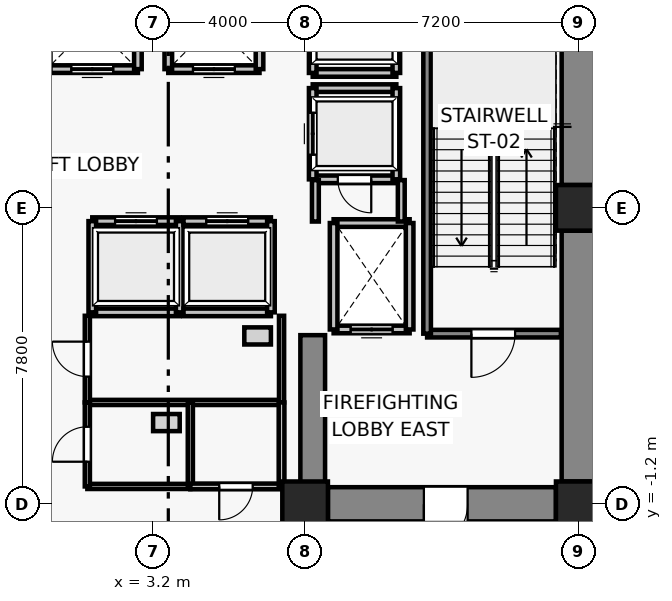
"""IFC4 building model, lengths in metres.
Left out: names, types, materials, properties, quantities, classifications, styles, units other than length and angle.
Written with IfcOpenShell. Run it as: python <this file> out.ifc"""

import sys

from ifc_helpers import new_model, si_unit, direction, frame, frame_2d, origin, origin_2d, place, context, subcontext, project, spatial, rectangle, extrude, source, transform, mapped, element, fill, save


model = new_model("IFC4")
c1 = context("Model", 3, precision=1e-05, world=origin(), true_north=direction((0.0, 1.0)))
c2 = subcontext(c1, "Body", "Model", "MODEL_VIEW")
j1 = project(units=[si_unit("LENGTHUNIT", "METRE"), si_unit("PLANEANGLEUNIT", "RADIAN")], contexts=[c1])
p1 = place(None, origin())
s1 = spatial("IfcSite", under=j1, at=p1, CompositionType="ELEMENT")
p2 = place(p1, origin())
s2 = spatial("IfcBuilding", under=s1, at=p2, CompositionType="ELEMENT")
p3 = place(p2, origin())
s3 = spatial("IfcBuildingStorey", under=s2, at=p3, CompositionType="ELEMENT", Elevation=0.0)
for number, where, z_axis, x_axis in (
    (1, (7.2, -1.2, 0.0), (0.0, 0.0, 1.0), (1.0, 0.0, 0.0)),
    (2, (14.4, -1.2, 0.0), (0.0, 0.0, 1.0), (1.0, 0.0, 0.0)),
    (3, (14.4, 6.6, 0.0), (0.0, 0.0, 1.0), (1.0, 0.0, 0.0)),
):
    element("IfcColumn", number, at=place(p3, frame(where, z_axis=z_axis, x_axis=x_axis)), inside=s3, PredefinedType="COLUMN", context=c2, shape_type="SweptSolid", body=[
        extrude(rectangle(XDim=1.2, YDim=1.2, at=origin_2d()), origin(), (0.0, 0.0, 1.0), 5.0),
    ])
p4 = place(p3, frame((14.4, -0.6, 0.0), z_axis=(0.0, 0.0, 1.0), x_axis=(0.0, 1.0, 0.0)))
e4 = element("IfcWall", 4, at=p4, inside=s3, PredefinedType="SHEAR", context=c2, shape_type="SweptSolid", body=[
    extrude(rectangle(XDim=6.6, YDim=0.9, at=frame_2d((3.3, 0.0))), origin(), (0.0, 0.0, 1.0), 4.7),
])
p5 = place(p3, frame((14.4, 7.2, 0.0), z_axis=(0.0, 0.0, 1.0), x_axis=(0.0, 1.0, 0.0)))
e5 = element("IfcWall", 5, at=p5, inside=s3, PredefinedType="SHEAR", context=c2, shape_type="SweptSolid", body=[
    extrude(rectangle(XDim=5.7, YDim=0.9, at=frame_2d((2.85, 0.0))), origin(), (0.0, 0.0, 1.0), 4.7),
])
p6 = place(p3, frame((13.8, -1.2, 0.0), z_axis=(0.0, 0.0, 1.0), x_axis=(-1.0, 0.0, 0.0)))
e6 = element("IfcWall", 6, at=p6, inside=s3, PredefinedType="SHEAR", context=c2, shape_type="SweptSolid", body=[
    extrude(rectangle(XDim=6.0, YDim=0.9, at=frame_2d((3.0, 0.0))), origin(), (0.0, 0.0, 1.0), 4.7),
])
p7 = place(p6, frame((2.325, 0.0, 0.0)))
e7 = element("IfcOpeningElement", 7, at=p7, cuts=e6, PredefinedType="OPENING", context=c2, shape_type="SweptSolid", body=[
    extrude(rectangle(XDim=1.15, YDim=2.15, at=frame_2d((0.575, 1.075))), frame((0.0, 0.46, 0.0), z_axis=(0.0, -1.0, 0.0), x_axis=(1.0, 0.0, 0.0)), (0.0, 0.0, 1.0), 0.92),
])
p8 = place(p3, frame((7.4, -0.75, 0.0), z_axis=(0.0, 0.0, 1.0), x_axis=(0.0, 1.0, 0.0)))
e8 = element("IfcWall", 8, at=p8, inside=s3, PredefinedType="SHEAR", context=c2, shape_type="SweptSolid", body=[
    extrude(rectangle(XDim=4.0, YDim=0.65, at=frame_2d((2.0, 0.0))), origin(), (0.0, 0.0, 1.0), 4.7),
])
p9 = place(p3, frame((9.95, 3.4, 0.0), z_axis=(0.0, 0.0, 1.0), x_axis=(-1.0, 0.0, 0.0)))
e9 = element("IfcWall", 9, at=p9, inside=s3, PredefinedType="SOLIDWALL", context=c2, shape_type="SweptSolid", body=[
    extrude(rectangle(XDim=2.0, YDim=0.2, at=frame_2d((1.0, 0.0))), origin(), (0.0, 0.0, 1.0), 4.7),
])
p10 = place(p9, frame((0.45, 0.0, 0.0)))
e10 = element("IfcOpeningElement", 10, at=p10, cuts=e9, PredefinedType="OPENING", context=c2, shape_type="SweptSolid", body=[
    extrude(rectangle(XDim=1.1, YDim=2.2, at=frame_2d((0.55, 1.1))), frame((0.0, 0.11, 0.0), z_axis=(0.0, -1.0, 0.0), x_axis=(1.0, 0.0, 0.0)), (0.0, 0.0, 1.0), 0.22),
])
p11 = place(p3, frame((7.95, 6.2, 0.0), z_axis=(0.0, 0.0, 1.0), x_axis=(1.0, 0.0, 0.0)))
e11 = element("IfcWall", 11, at=p11, inside=s3, PredefinedType="SOLIDWALL", context=c2, shape_type="SweptSolid", body=[
    extrude(rectangle(XDim=2.0, YDim=0.2, at=frame_2d((1.0, 0.0))), origin(), (0.0, 0.0, 1.0), 4.7),
])
for number, where, z_axis, x_axis in (
    (12, (7.95, 3.4, 0.0), (0.0, 0.0, 1.0), (0.0, 1.0, 0.0)),
    (13, (9.95, 6.2, 0.0), (0.0, 0.0, 1.0), (0.0, -1.0, 0.0)),
):
    element("IfcWall", number, at=place(p3, frame(where, z_axis=z_axis, x_axis=x_axis)), inside=s3, PredefinedType="SOLIDWALL", context=c2, shape_type="SweptSolid", body=[
        extrude(rectangle(XDim=2.8, YDim=0.2, at=frame_2d((1.4, 0.0))), origin(), (0.0, 0.0, 1.0), 4.7),
    ])
p12 = place(p3, frame((2.8, 10.25, 0.0), z_axis=(0.0, 0.0, 1.0), x_axis=(-1.0, 0.0, 0.0)))
e14 = element("IfcWall", 14, at=p12, inside=s3, PredefinedType="SOLIDWALL", context=c2, shape_type="SweptSolid", body=[
    extrude(rectangle(XDim=2.4, YDim=0.2, at=frame_2d((1.2, 0.0))), origin(), (0.0, 0.0, 1.0), 4.7),
])
p13 = place(p12, frame((0.65, 0.0, 0.0)))
e15 = element("IfcOpeningElement", 15, at=p13, cuts=e14, PredefinedType="OPENING", context=c2, shape_type="SweptSolid", body=[
    extrude(rectangle(XDim=1.1, YDim=2.2, at=frame_2d((0.55, 1.1))), frame((0.0, 0.11, 0.0), z_axis=(0.0, -1.0, 0.0), x_axis=(1.0, 0.0, 0.0)), (0.0, 0.0, 1.0), 0.22),
])
p14 = place(p3, frame((2.8, 12.65, 0.0), z_axis=(0.0, 0.0, 1.0), x_axis=(0.0, -1.0, 0.0)))
e16 = element("IfcWall", 16, at=p14, inside=s3, PredefinedType="SOLIDWALL", context=c2, shape_type="SweptSolid", body=[
    extrude(rectangle(XDim=2.4, YDim=0.2, at=frame_2d((1.2, 0.0))), origin(), (0.0, 0.0, 1.0), 4.7),
])
p15 = place(p3, frame((6.0, 10.25, 0.0), z_axis=(0.0, 0.0, 1.0), x_axis=(-1.0, 0.0, 0.0)))
e17 = element("IfcWall", 17, at=p15, inside=s3, PredefinedType="SOLIDWALL", context=c2, shape_type="SweptSolid", body=[
    extrude(rectangle(XDim=2.4, YDim=0.2, at=frame_2d((1.2, 0.0))), origin(), (0.0, 0.0, 1.0), 4.7),
])
p16 = place(p15, frame((0.65, 0.0, 0.0)))
e18 = element("IfcOpeningElement", 18, at=p16, cuts=e17, PredefinedType="OPENING", context=c2, shape_type="SweptSolid", body=[
    extrude(rectangle(XDim=1.1, YDim=2.2, at=frame_2d((0.55, 1.1))), frame((0.0, 0.11, 0.0), z_axis=(0.0, -1.0, 0.0), x_axis=(1.0, 0.0, 0.0)), (0.0, 0.0, 1.0), 0.22),
])
for number, where, z_axis, x_axis in (
    (19, (3.6, 10.25, 0.0), (0.0, 0.0, 1.0), (0.0, 1.0, 0.0)),
    (20, (6.0, 12.65, 0.0), (0.0, 0.0, 1.0), (0.0, -1.0, 0.0)),
):
    element("IfcWall", number, at=place(p3, frame(where, z_axis=z_axis, x_axis=x_axis)), inside=s3, PredefinedType="SOLIDWALL", context=c2, shape_type="SweptSolid", body=[
        extrude(rectangle(XDim=2.4, YDim=0.2, at=frame_2d((1.2, 0.0))), origin(), (0.0, 0.0, 1.0), 4.7),
    ])
p17 = place(p3, frame((3.9, 3.85, 0.0), z_axis=(0.0, 0.0, 1.0), x_axis=(-1.0, 0.0, 0.0)))
e21 = element("IfcWall", 21, at=p17, inside=s3, PredefinedType="SOLIDWALL", context=c2, shape_type="SweptSolid", body=[
    extrude(rectangle(XDim=2.3, YDim=0.2, at=frame_2d((1.15, 0.0))), origin(), (0.0, 0.0, 1.0), 4.7),
])
p18 = place(p3, frame((1.6, 6.25, 0.0), z_axis=(0.0, 0.0, 1.0), x_axis=(1.0, 0.0, 0.0)))
e22 = element("IfcWall", 22, at=p18, inside=s3, PredefinedType="SOLIDWALL", context=c2, shape_type="SweptSolid", body=[
    extrude(rectangle(XDim=2.3, YDim=0.2, at=frame_2d((1.15, 0.0))), origin(), (0.0, 0.0, 1.0), 4.7),
])
p19 = place(p18, frame((0.6, 0.0, 0.0)))
e23 = element("IfcOpeningElement", 23, at=p19, cuts=e22, PredefinedType="OPENING", context=c2, shape_type="SweptSolid", body=[
    extrude(rectangle(XDim=1.1, YDim=2.2, at=frame_2d((0.55, 1.1))), frame((0.0, 0.11, 0.0), z_axis=(0.0, -1.0, 0.0), x_axis=(1.0, 0.0, 0.0)), (0.0, 0.0, 1.0), 0.22),
])
for number, where, z_axis, x_axis in (
    (24, (1.6, 3.85, 0.0), (0.0, 0.0, 1.0), (0.0, 1.0, 0.0)),
    (25, (3.9, 6.25, 0.0), (0.0, 0.0, 1.0), (0.0, -1.0, 0.0)),
):
    element("IfcWall", number, at=place(p3, frame(where, z_axis=z_axis, x_axis=x_axis)), inside=s3, PredefinedType="SOLIDWALL", context=c2, shape_type="SweptSolid", body=[
        extrude(rectangle(XDim=2.4, YDim=0.2, at=frame_2d((1.2, 0.0))), origin(), (0.0, 0.0, 1.0), 4.7),
    ])
p20 = place(p3, frame((6.3, 3.85, 0.0), z_axis=(0.0, 0.0, 1.0), x_axis=(-1.0, 0.0, 0.0)))
e26 = element("IfcWall", 26, at=p20, inside=s3, PredefinedType="SOLIDWALL", context=c2, shape_type="SweptSolid", body=[
    extrude(rectangle(XDim=2.3, YDim=0.2, at=frame_2d((1.15, 0.0))), origin(), (0.0, 0.0, 1.0), 4.7),
])
p21 = place(p3, frame((4.0, 6.25, 0.0), z_axis=(0.0, 0.0, 1.0), x_axis=(1.0, 0.0, 0.0)))
e27 = element("IfcWall", 27, at=p21, inside=s3, PredefinedType="SOLIDWALL", context=c2, shape_type="SweptSolid", body=[
    extrude(rectangle(XDim=2.3, YDim=0.2, at=frame_2d((1.15, 0.0))), origin(), (0.0, 0.0, 1.0), 4.7),
])
p22 = place(p21, frame((0.6, 0.0, 0.0)))
e28 = element("IfcOpeningElement", 28, at=p22, cuts=e27, PredefinedType="OPENING", context=c2, shape_type="SweptSolid", body=[
    extrude(rectangle(XDim=1.1, YDim=2.2, at=frame_2d((0.55, 1.1))), frame((0.0, 0.11, 0.0), z_axis=(0.0, -1.0, 0.0), x_axis=(1.0, 0.0, 0.0)), (0.0, 0.0, 1.0), 0.22),
])
p23 = place(p3, frame((6.3, 6.25, 0.0), z_axis=(0.0, 0.0, 1.0), x_axis=(0.0, -1.0, 0.0)))
e29 = element("IfcWall", 29, at=p23, inside=s3, PredefinedType="SOLIDWALL", context=c2, shape_type="SweptSolid", body=[
    extrude(rectangle(XDim=2.4, YDim=0.2, at=frame_2d((1.2, 0.0))), origin(), (0.0, 0.0, 1.0), 4.7),
])
p24 = place(p3, frame((9.6, 7.35, 0.0), z_axis=(0.0, 0.0, 1.0), x_axis=(-1.0, 0.0, 0.0)))
e30 = element("IfcWall", 30, at=p24, inside=s3, PredefinedType="SOLIDWALL", context=c2, shape_type="SweptSolid", body=[
    extrude(rectangle(XDim=2.2, YDim=0.2, at=frame_2d((1.1, 0.0))), origin(), (0.0, 0.0, 1.0), 3.79),
])
p25 = place(p24, frame((0.66, 0.0, 0.0)))
e31 = element("IfcOpeningElement", 31, at=p25, cuts=e30, PredefinedType="OPENING", context=c2, shape_type="SweptSolid", body=[
    extrude(rectangle(XDim=0.88, YDim=2.1, at=frame_2d((0.44, 1.05))), frame((0.0, 0.11, 0.0), z_axis=(0.0, -1.0, 0.0), x_axis=(1.0, 0.0, 0.0)), (0.0, 0.0, 1.0), 0.22),
])
p26 = place(p3, frame((7.4, 9.75, 0.0), z_axis=(0.0, 0.0, 1.0), x_axis=(1.0, 0.0, 0.0)))
e32 = element("IfcWall", 32, at=p26, inside=s3, PredefinedType="SOLIDWALL", context=c2, shape_type="SweptSolid", body=[
    extrude(rectangle(XDim=2.2, YDim=0.2, at=frame_2d((1.1, 0.0))), origin(), (0.0, 0.0, 1.0), 3.79),
])
p27 = place(p3, frame((7.4, 7.35, 0.0), z_axis=(0.0, 0.0, 1.0), x_axis=(0.0, 1.0, 0.0)))
e33 = element("IfcWall", 33, at=p27, inside=s3, PredefinedType="SOLIDWALL", context=c2, shape_type="SweptSolid", body=[
    extrude(rectangle(XDim=2.4, YDim=0.2, at=frame_2d((1.2, 0.0))), origin(), (0.0, 0.0, 1.0), 3.79),
])
p28 = place(p27, frame((0.65, 0.0, 0.0)))
e34 = element("IfcOpeningElement", 34, at=p28, cuts=e33, PredefinedType="OPENING", context=c2, shape_type="SweptSolid", body=[
    extrude(rectangle(XDim=1.1, YDim=2.2, at=frame_2d((0.55, 1.1))), frame((0.0, 0.11, 0.0), z_axis=(0.0, -1.0, 0.0), x_axis=(1.0, 0.0, 0.0)), (0.0, 0.0, 1.0), 0.22),
])
p29 = place(p3, frame((9.6, 9.75, 0.0), z_axis=(0.0, 0.0, 1.0), x_axis=(0.0, -1.0, 0.0)))
e35 = element("IfcWall", 35, at=p29, inside=s3, PredefinedType="SOLIDWALL", context=c2, shape_type="SweptSolid", body=[
    extrude(rectangle(XDim=2.4, YDim=0.2, at=frame_2d((1.2, 0.0))), origin(), (0.0, 0.0, 1.0), 4.7),
])
p30 = place(p3, frame((9.6, 10.15, 0.0), z_axis=(0.0, 0.0, 1.0), x_axis=(-1.0, 0.0, 0.0)))
e36 = element("IfcWall", 36, at=p30, inside=s3, PredefinedType="SOLIDWALL", context=c2, shape_type="SweptSolid", body=[
    extrude(rectangle(XDim=2.2, YDim=0.2, at=frame_2d((1.1, 0.0))), origin(), (0.0, 0.0, 1.0), 3.79),
])
p31 = place(p3, frame((7.4, 10.15, 0.0), z_axis=(0.0, 0.0, 1.0), x_axis=(0.0, 1.0, 0.0)))
e37 = element("IfcWall", 37, at=p31, inside=s3, PredefinedType="SOLIDWALL", context=c2, shape_type="SweptSolid", body=[
    extrude(rectangle(XDim=2.4, YDim=0.2, at=frame_2d((1.2, 0.0))), origin(), (0.0, 0.0, 1.0), 3.79),
])
p32 = place(p31, frame((0.65, 0.0, 0.0)))
e38 = element("IfcOpeningElement", 38, at=p32, cuts=e37, PredefinedType="OPENING", context=c2, shape_type="SweptSolid", body=[
    extrude(rectangle(XDim=1.1, YDim=2.2, at=frame_2d((0.55, 1.1))), frame((0.0, 0.11, 0.0), z_axis=(0.0, -1.0, 0.0), x_axis=(1.0, 0.0, 0.0)), (0.0, 0.0, 1.0), 0.22),
])
p33 = place(p3, frame((9.6, 12.55, 0.0), z_axis=(0.0, 0.0, 1.0), x_axis=(0.0, -1.0, 0.0)))
e39 = element("IfcWall", 39, at=p33, inside=s3, PredefinedType="SOLIDWALL", context=c2, shape_type="SweptSolid", body=[
    extrude(rectangle(XDim=2.4, YDim=0.2, at=frame_2d((1.2, 0.0))), origin(), (0.0, 0.0, 1.0), 4.7),
])
p34 = place(p3, frame((13.93, 3.29, 0.0), z_axis=(0.0, 0.0, 1.0), x_axis=(-1.0, 0.0, 0.0)))
e40 = element("IfcWall", 40, at=p34, inside=s3, PredefinedType="SOLIDWALL", context=c2, shape_type="SweptSolid", body=[
    extrude(rectangle(XDim=3.52, YDim=0.2, at=frame_2d((1.76, 0.0))), origin(), (0.0, 0.0, 1.0), 4.7),
])
p35 = place(p34, frame((1.205, 0.0, 0.0)))
e41 = element("IfcOpeningElement", 41, at=p35, cuts=e40, PredefinedType="OPENING", context=c2, shape_type="SweptSolid", body=[
    extrude(rectangle(XDim=1.15, YDim=2.15, at=frame_2d((0.575, 1.075))), frame((0.0, 0.11, 0.0), z_axis=(0.0, -1.0, 0.0), x_axis=(1.0, 0.0, 0.0)), (0.0, 0.0, 1.0), 0.22),
])
p36 = place(p3, frame((10.41, 3.29, 0.0), z_axis=(0.0, 0.0, 1.0), x_axis=(0.0, 1.0, 0.0)))
e42 = element("IfcWall", 42, at=p36, inside=s3, PredefinedType="SOLIDWALL", context=c2, shape_type="SweptSolid", body=[
    extrude(rectangle(XDim=8.84, YDim=0.2, at=frame_2d((4.42, 0.0))), origin(), (0.0, 0.0, 1.0), 4.7),
])
p37 = place(p3, frame((7.47, 6.24, 0.0), z_axis=(0.0, 0.0, 1.0), x_axis=(0.0, 1.0, 0.0)))
e43 = element("IfcWall", 43, at=p37, inside=s3, PredefinedType="PARTITIONING", context=c2, shape_type="SweptSolid", body=[
    extrude(rectangle(XDim=1.09, YDim=0.18, at=frame_2d((0.545, 0.0))), origin(), (0.0, 0.0, 1.0), 3.79),
])
p38 = place(p3, frame((9.73, 7.33, 0.0), z_axis=(0.0, 0.0, 1.0), x_axis=(0.0, -1.0, 0.0)))
e44 = element("IfcWall", 44, at=p38, inside=s3, PredefinedType="PARTITIONING", context=c2, shape_type="SweptSolid", body=[
    extrude(rectangle(XDim=1.09, YDim=0.18, at=frame_2d((0.545, 0.0))), origin(), (0.0, 0.0, 1.0), 4.7),
])
p39 = place(p3, frame((6.58, 1.48, 0.0), z_axis=(0.0, 0.0, 1.0), x_axis=(-1.0, 0.0, 0.0)))
e45 = element("IfcWall", 45, at=p39, inside=s3, PredefinedType="PARTITIONING", context=c2, shape_type="SweptSolid", body=[
    extrude(rectangle(XDim=5.11, YDim=0.135, at=frame_2d((2.555, 0.0))), origin(), (0.0, 0.0, 1.0), 4.7),
])
p40 = place(p3, frame((1.47, 1.48, 0.0), z_axis=(0.0, 0.0, 1.0), x_axis=(0.0, 1.0, 0.0)))
e46 = element("IfcWall", 46, at=p40, inside=s3, PredefinedType="PARTITIONING", context=c2, shape_type="SweptSolid", body=[
    extrude(rectangle(XDim=2.28, YDim=0.135, at=frame_2d((1.14, 0.0))), origin(), (0.0, 0.0, 1.0), 4.073),
])
p41 = place(p40, frame((0.68, 0.0, 0.0)))
e47 = element("IfcOpeningElement", 47, at=p41, cuts=e46, PredefinedType="OPENING", context=c2, shape_type="SweptSolid", body=[
    extrude(rectangle(XDim=0.92, YDim=2.1, at=frame_2d((0.46, 1.05))), frame((0.0, 0.077, 0.0), z_axis=(0.0, -1.0, 0.0), x_axis=(1.0, 0.0, 0.0)), (0.0, 0.0, 1.0), 0.155),
])
p42 = place(p3, frame((6.58, 3.76, 0.0), z_axis=(0.0, 0.0, 1.0), x_axis=(0.0, -1.0, 0.0)))
e48 = element("IfcWall", 48, at=p42, inside=s3, PredefinedType="PARTITIONING", context=c2, shape_type="SweptSolid", body=[
    extrude(rectangle(XDim=2.28, YDim=0.135, at=frame_2d((1.14, 0.0))), origin(), (0.0, 0.0, 1.0), 4.073),
])
p43 = place(p3, frame((4.18, -0.73, 0.0), z_axis=(0.0, 0.0, 1.0), x_axis=(-1.0, 0.0, 0.0)))
e49 = element("IfcWall", 49, at=p43, inside=s3, PredefinedType="PARTITIONING", context=c2, shape_type="SweptSolid", body=[
    extrude(rectangle(XDim=2.71, YDim=0.135, at=frame_2d((1.355, 0.0))), origin(), (0.0, 0.0, 1.0), 4.7),
])
p44 = place(p3, frame((1.47, -0.73, 0.0), z_axis=(0.0, 0.0, 1.0), x_axis=(0.0, 1.0, 0.0)))
e50 = element("IfcWall", 50, at=p44, inside=s3, PredefinedType="PARTITIONING", context=c2, shape_type="SweptSolid", body=[
    extrude(rectangle(XDim=2.21, YDim=0.135, at=frame_2d((1.105, 0.0))), origin(), (0.0, 0.0, 1.0), 4.7),
])
p45 = place(p44, frame((0.65, 0.0, 0.0)))
e51 = element("IfcOpeningElement", 51, at=p45, cuts=e50, PredefinedType="OPENING", context=c2, shape_type="SweptSolid", body=[
    extrude(rectangle(XDim=0.92, YDim=2.1, at=frame_2d((0.46, 1.05))), frame((0.0, 0.077, 0.0), z_axis=(0.0, -1.0, 0.0), x_axis=(1.0, 0.0, 0.0)), (0.0, 0.0, 1.0), 0.155),
])
p46 = place(p3, frame((4.18, 1.48, 0.0), z_axis=(0.0, 0.0, 1.0), x_axis=(0.0, -1.0, 0.0)))
e52 = element("IfcWall", 52, at=p46, inside=s3, PredefinedType="PARTITIONING", context=c2, shape_type="SweptSolid", body=[
    extrude(rectangle(XDim=2.21, YDim=0.135, at=frame_2d((1.105, 0.0))), origin(), (0.0, 0.0, 1.0), 4.7),
])
p47 = place(p3, frame((6.58, -0.73, 0.0), z_axis=(0.0, 0.0, 1.0), x_axis=(-1.0, 0.0, 0.0)))
e53 = element("IfcWall", 53, at=p47, inside=s3, PredefinedType="PARTITIONING", context=c2, shape_type="SweptSolid", body=[
    extrude(rectangle(XDim=2.4, YDim=0.15, at=frame_2d((1.2, 0.0))), origin(), (0.0, 0.0, 1.0), 4.7),
])
p48 = place(p47, frame((0.76, 0.0, 0.0)))
e54 = element("IfcOpeningElement", 54, at=p48, cuts=e53, PredefinedType="OPENING", context=c2, shape_type="SweptSolid", body=[
    extrude(rectangle(XDim=0.88, YDim=2.1, at=frame_2d((0.44, 1.05))), frame((0.0, 0.085, 0.0), z_axis=(0.0, -1.0, 0.0), x_axis=(1.0, 0.0, 0.0)), (0.0, 0.0, 1.0), 0.17),
])
p49 = place(p3, frame((6.58, 1.48, 0.0), z_axis=(0.0, 0.0, 1.0), x_axis=(0.0, -1.0, 0.0)))
e55 = element("IfcWall", 55, at=p49, inside=s3, PredefinedType="PARTITIONING", context=c2, shape_type="SweptSolid", body=[
    extrude(rectangle(XDim=2.21, YDim=0.15, at=frame_2d((1.105, 0.0))), origin(), (0.0, 0.0, 1.0), 4.7),
])
m1 = source(origin(), c2, "Body", "SweptSolid", [
    extrude(rectangle(XDim=1.1, YDim=2.2, at=frame_2d((0.55, 1.1))), frame((0.0, 0.025, 0.0), z_axis=(0.0, -1.0, 0.0), x_axis=(1.0, 0.0, 0.0)), (0.0, 0.0, 1.0), 0.05),
])
p50 = place(p10, origin())
e56 = element("IfcDoor", 56, at=p50, inside=s3, OperationType="DOUBLE_DOOR_SLIDING", PredefinedType="DOOR", context=c2, shape_type="MappedRepresentation", body=[
    mapped(m1, transform((0.0, 0.0, 0.0), x_axis=(1.0, 0.0, 0.0), y_axis=(0.0, 1.0, 0.0), z_axis=(0.0, 0.0, 1.0), scale=1.0)),
])
fill(e10, e56)
p51 = place(p13, origin())
e57 = element("IfcDoor", 57, at=p51, inside=s3, OperationType="DOUBLE_DOOR_SLIDING", PredefinedType="DOOR", context=c2, shape_type="MappedRepresentation", body=[
    mapped(m1, transform((0.0, 0.0, 0.0), x_axis=(1.0, 0.0, 0.0), y_axis=(0.0, 1.0, 0.0), z_axis=(0.0, 0.0, 1.0), scale=1.0)),
])
fill(e15, e57)
p52 = place(p16, origin())
e58 = element("IfcDoor", 58, at=p52, inside=s3, OperationType="DOUBLE_DOOR_SLIDING", PredefinedType="DOOR", context=c2, shape_type="MappedRepresentation", body=[
    mapped(m1, transform((0.0, 0.0, 0.0), x_axis=(1.0, 0.0, 0.0), y_axis=(0.0, 1.0, 0.0), z_axis=(0.0, 0.0, 1.0), scale=1.0)),
])
fill(e18, e58)
p53 = place(p19, origin())
e59 = element("IfcDoor", 59, at=p53, inside=s3, OperationType="DOUBLE_DOOR_SLIDING", PredefinedType="DOOR", context=c2, shape_type="MappedRepresentation", body=[
    mapped(m1, transform((0.0, 0.0, 0.0), x_axis=(1.0, 0.0, 0.0), y_axis=(0.0, 1.0, 0.0), z_axis=(0.0, 0.0, 1.0), scale=1.0)),
])
fill(e23, e59)
p54 = place(p22, origin())
e60 = element("IfcDoor", 60, at=p54, inside=s3, OperationType="DOUBLE_DOOR_SLIDING", PredefinedType="DOOR", context=c2, shape_type="MappedRepresentation", body=[
    mapped(m1, transform((0.0, 0.0, 0.0), x_axis=(1.0, 0.0, 0.0), y_axis=(0.0, 1.0, 0.0), z_axis=(0.0, 0.0, 1.0), scale=1.0)),
])
fill(e28, e60)
p55 = place(p28, origin())
e61 = element("IfcDoor", 61, at=p55, inside=s3, OperationType="DOUBLE_DOOR_SLIDING", PredefinedType="DOOR", context=c2, shape_type="MappedRepresentation", body=[
    mapped(m1, transform((0.0, 0.0, 0.0), x_axis=(1.0, 0.0, 0.0), y_axis=(0.0, 1.0, 0.0), z_axis=(0.0, 0.0, 1.0), scale=1.0)),
])
fill(e34, e61)
m2 = source(origin(), c2, "Body", "SweptSolid", [
    extrude(rectangle(XDim=1.15, YDim=2.15, at=frame_2d((0.575, 1.075))), frame((0.0, 0.025, 0.0), z_axis=(0.0, -1.0, 0.0), x_axis=(1.0, 0.0, 0.0)), (0.0, 0.0, 1.0), 0.05),
])
p56 = place(p35, origin())
e62 = element("IfcDoor", 62, at=p56, inside=s3, OperationType="SINGLE_SWING_RIGHT", PredefinedType="DOOR", context=c2, shape_type="MappedRepresentation", body=[
    mapped(m2, transform((0.0, 0.0, 0.0), x_axis=(1.0, 0.0, 0.0), y_axis=(0.0, 1.0, 0.0), z_axis=(0.0, 0.0, 1.0), scale=1.0)),
])
fill(e41, e62)
p57 = place(p7, origin())
e63 = element("IfcDoor", 63, at=p57, inside=s3, OperationType="SINGLE_SWING_RIGHT", PredefinedType="DOOR", context=c2, shape_type="MappedRepresentation", body=[
    mapped(m2, transform((0.0, 0.0, 0.0), x_axis=(1.0, 0.0, 0.0), y_axis=(0.0, 1.0, 0.0), z_axis=(0.0, 0.0, 1.0), scale=1.0)),
])
fill(e7, e63)
m3 = source(origin(), c2, "Body", "SweptSolid", [
    extrude(rectangle(XDim=0.92, YDim=2.1, at=frame_2d((0.46, 1.05))), frame((0.0, 0.025, 0.0), z_axis=(0.0, -1.0, 0.0), x_axis=(1.0, 0.0, 0.0)), (0.0, 0.0, 1.0), 0.05),
])
p58 = place(p41, origin())
e64 = element("IfcDoor", 64, at=p58, inside=s3, OperationType="SINGLE_SWING_RIGHT", PredefinedType="DOOR", context=c2, shape_type="MappedRepresentation", body=[
    mapped(m3, transform((0.0, 0.0, 0.0), x_axis=(1.0, 0.0, 0.0), y_axis=(0.0, 1.0, 0.0), z_axis=(0.0, 0.0, 1.0), scale=1.0)),
])
fill(e47, e64)
p59 = place(p45, origin())
e65 = element("IfcDoor", 65, at=p59, inside=s3, OperationType="SINGLE_SWING_LEFT", PredefinedType="DOOR", context=c2, shape_type="MappedRepresentation", body=[
    mapped(m3, transform((0.0, 0.0, 0.0), x_axis=(1.0, 0.0, 0.0), y_axis=(0.0, 1.0, 0.0), z_axis=(0.0, 0.0, 1.0), scale=1.0)),
])
fill(e51, e65)
m4 = source(origin(), c2, "Body", "SweptSolid", [
    extrude(rectangle(XDim=0.88, YDim=2.1, at=frame_2d((0.44, 1.05))), frame((0.0, 0.025, 0.0), z_axis=(0.0, -1.0, 0.0), x_axis=(1.0, 0.0, 0.0)), (0.0, 0.0, 1.0), 0.05),
])
p60 = place(p48, origin())
e66 = element("IfcDoor", 66, at=p60, inside=s3, OperationType="SINGLE_SWING_RIGHT", PredefinedType="DOOR", context=c2, shape_type="MappedRepresentation", body=[
    mapped(m4, transform((0.0, 0.0, 0.0), x_axis=(1.0, 0.0, 0.0), y_axis=(0.0, 1.0, 0.0), z_axis=(0.0, 0.0, 1.0), scale=1.0)),
])
fill(e54, e66)
p61 = place(p25, origin())
e67 = element("IfcDoor", 67, at=p61, inside=s3, OperationType="SINGLE_SWING_LEFT", PredefinedType="DOOR", context=c2, shape_type="MappedRepresentation", body=[
    mapped(m4, transform((0.0, 0.0, 0.0), x_axis=(1.0, 0.0, 0.0), y_axis=(0.0, 1.0, 0.0), z_axis=(0.0, 0.0, 1.0), scale=1.0)),
])
fill(e31, e67)
save(model, sys.argv[1])
